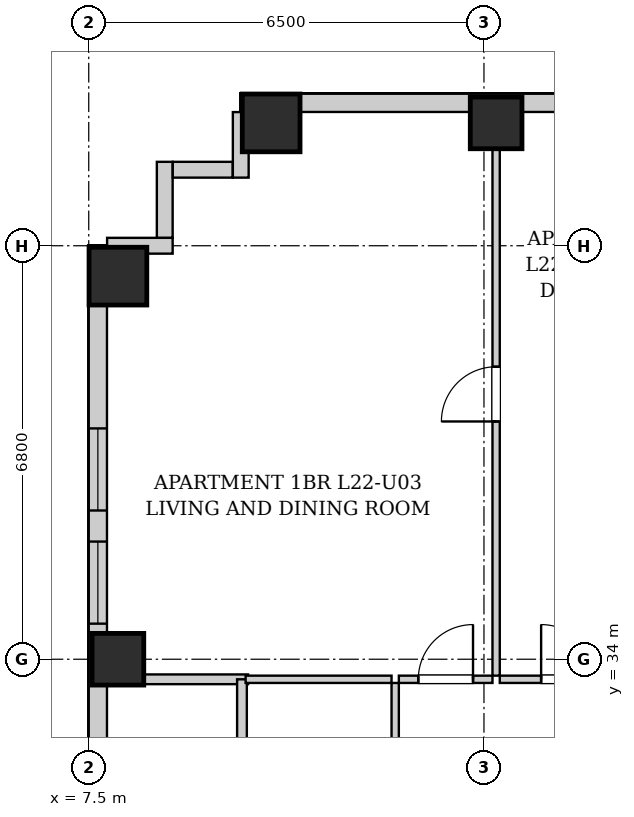
"""IFC4 building model, lengths in metres.
Left out: names, types, materials, properties, quantities, classifications, styles, units other than length and angle.
Written with IfcOpenShell. Run it as: python <this file> out.ifc"""

import sys

from ifc_helpers import new_model, si_unit, direction, frame, frame_2d, origin, origin_2d, place, context, subcontext, project, spatial, rectangle, extrude, element, fill, save


model = new_model("IFC4")
c1 = context("Model", 3, precision=1e-05, world=origin(), true_north=direction((0.0, 1.0)))
c2 = subcontext(c1, "Body", "Model", "MODEL_VIEW")
j1 = project(units=[si_unit("LENGTHUNIT", "METRE"), si_unit("PLANEANGLEUNIT", "RADIAN")], contexts=[c1])
p1 = place(None, origin())
s1 = spatial("IfcSite", under=j1, at=p1, CompositionType="ELEMENT")
p2 = place(p1, origin())
s2 = spatial("IfcBuilding", under=s1, at=p2, CompositionType="ELEMENT")
p3 = place(p2, frame((0.0, 0.0, 81.5)))
s3 = spatial("IfcBuildingStorey", under=s2, at=p3, CompositionType="ELEMENT", Elevation=81.5)
p4 = place(p3, frame((10.5, 42.82, 0.0), z_axis=(0.0, 0.0, 1.0), x_axis=(1.0, 0.0, 0.0)))
e1 = element("IfcColumn", 1, at=p4, inside=s3, PredefinedType="COLUMN", context=c2, shape_type="SweptSolid", body=[
    extrude(rectangle(XDim=0.95, YDim=0.95, at=origin_2d()), origin(), (0.0, 0.0, 1.0), 3.2),
])
for number, where, z_axis, x_axis in (
    (2, (14.2, 42.82, 0.0), (0.0, 0.0, 1.0), (1.0, 0.0, 0.0)),
    (3, (7.98, 34.0, 0.0), (0.0, 0.0, 1.0), (1.0, 0.0, 0.0)),
):
    element("IfcColumn", number, at=place(p3, frame(where, z_axis=z_axis, x_axis=x_axis)), inside=s3, PredefinedType="COLUMN", context=c2, shape_type="SweptSolid", body=[
        extrude(rectangle(XDim=0.85, YDim=0.85, at=origin_2d()), origin(), (0.0, 0.0, 1.0), 3.2),
    ])
p5 = place(p3, frame((7.98, 40.3, 0.0), z_axis=(0.0, 0.0, 1.0), x_axis=(1.0, 0.0, 0.0)))
e4 = element("IfcColumn", 4, at=p5, inside=s3, PredefinedType="COLUMN", context=c2, shape_type="SweptSolid", body=[
    extrude(rectangle(XDim=0.95, YDim=0.95, at=origin_2d()), origin(), (0.0, 0.0, 1.0), 3.2),
])
p6 = place(p3, frame((10.0, 43.15, 0.0), z_axis=(0.0, 0.0, 1.0), x_axis=(1.0, 0.0, 0.0)))
e5 = element("IfcWall", 5, at=p6, inside=s3, PredefinedType="SOLIDWALL", context=c2, shape_type="SweptSolid", body=[
    extrude(rectangle(XDim=22.5, YDim=0.3, at=frame_2d((11.25, 0.0))), origin(), (0.0, 0.0, 1.0), 2.94),
])
p7 = place(p6, frame((5.475, 0.0, 0.55)))
e6 = element("IfcOpeningElement", 6, at=p7, cuts=e5, PredefinedType="OPENING", context=c2, shape_type="SweptSolid", body=[
    extrude(rectangle(XDim=1.35, YDim=1.2, at=frame_2d((0.675, 0.6))), frame((0.0, 0.16, 0.0), z_axis=(0.0, -1.0, 0.0), x_axis=(1.0, 0.0, 0.0)), (0.0, 0.0, 1.0), 0.32),
])
p8 = place(p6, frame((9.3, 0.0, 0.55)))
e7 = element("IfcOpeningElement", 7, at=p8, cuts=e5, PredefinedType="OPENING", context=c2, shape_type="SweptSolid", body=[
    extrude(rectangle(XDim=1.35, YDim=1.2, at=frame_2d((0.675, 0.6))), frame((0.0, 0.16, 0.0), z_axis=(0.0, -1.0, 0.0), x_axis=(1.0, 0.0, 0.0)), (0.0, 0.0, 1.0), 0.32),
])
p9 = place(p6, frame((18.975, 0.0, 0.55)))
e8 = element("IfcOpeningElement", 8, at=p9, cuts=e5, PredefinedType="OPENING", context=c2, shape_type="SweptSolid", body=[
    extrude(rectangle(XDim=1.35, YDim=1.2, at=frame_2d((0.675, 0.6))), frame((0.0, 0.16, 0.0), z_axis=(0.0, -1.0, 0.0), x_axis=(1.0, 0.0, 0.0)), (0.0, 0.0, 1.0), 0.32),
])
p10 = place(p6, frame((21.59, 0.0, 0.55)))
e9 = element("IfcOpeningElement", 9, at=p10, cuts=e5, PredefinedType="OPENING", context=c2, shape_type="SweptSolid", body=[
    extrude(rectangle(XDim=0.68, YDim=1.2, at=frame_2d((0.34, 0.6))), frame((0.0, 0.16, 0.0), z_axis=(0.0, -1.0, 0.0), x_axis=(1.0, 0.0, 0.0)), (0.0, 0.0, 1.0), 0.32),
])
p11 = place(p3, frame((7.65, 2.5, 0.0), z_axis=(0.0, 0.0, 1.0), x_axis=(0.0, 1.0, 0.0)))
e10 = element("IfcWall", 10, at=p11, inside=s3, PredefinedType="SOLIDWALL", context=c2, shape_type="SweptSolid", body=[
    extrude(rectangle(XDim=38.3, YDim=0.3, at=frame_2d((19.15, 0.0))), origin(), (0.0, 0.0, 1.0), 2.94),
])
p12 = place(p11, frame((3.38, 0.0, 0.55)))
e11 = element("IfcOpeningElement", 11, at=p12, cuts=e10, PredefinedType="OPENING", context=c2, shape_type="SweptSolid", body=[
    extrude(rectangle(XDim=1.35, YDim=1.2, at=frame_2d((0.675, 0.6))), frame((0.0, 0.16, 0.0), z_axis=(0.0, -1.0, 0.0), x_axis=(1.0, 0.0, 0.0)), (0.0, 0.0, 1.0), 0.32),
])
p13 = place(p11, frame((1.135, 0.0, 0.55)))
e12 = element("IfcOpeningElement", 12, at=p13, cuts=e10, PredefinedType="OPENING", context=c2, shape_type="SweptSolid", body=[
    extrude(rectangle(XDim=1.35, YDim=1.2, at=frame_2d((0.675, 0.6))), frame((0.0, 0.16, 0.0), z_axis=(0.0, -1.0, 0.0), x_axis=(1.0, 0.0, 0.0)), (0.0, 0.0, 1.0), 0.32),
])
p14 = place(p11, frame((33.946, 0.0, 0.55)))
e13 = element("IfcOpeningElement", 13, at=p14, cuts=e10, PredefinedType="OPENING", context=c2, shape_type="SweptSolid", body=[
    extrude(rectangle(XDim=1.35, YDim=1.2, at=frame_2d((0.675, 0.6))), frame((0.0, 0.16, 0.0), z_axis=(0.0, -1.0, 0.0), x_axis=(1.0, 0.0, 0.0)), (0.0, 0.0, 1.0), 0.32),
])
p15 = place(p11, frame((32.085, 0.0, 0.55)))
e14 = element("IfcOpeningElement", 14, at=p15, cuts=e10, PredefinedType="OPENING", context=c2, shape_type="SweptSolid", body=[
    extrude(rectangle(XDim=1.35, YDim=1.2, at=frame_2d((0.675, 0.6))), frame((0.0, 0.16, 0.0), z_axis=(0.0, -1.0, 0.0), x_axis=(1.0, 0.0, 0.0)), (0.0, 0.0, 1.0), 0.32),
])
p16 = place(p11, frame((14.194, 0.0, 0.55)))
e15 = element("IfcOpeningElement", 15, at=p16, cuts=e10, PredefinedType="OPENING", context=c2, shape_type="SweptSolid", body=[
    extrude(rectangle(XDim=1.35, YDim=1.2, at=frame_2d((0.675, 0.6))), frame((0.0, 0.16, 0.0), z_axis=(0.0, -1.0, 0.0), x_axis=(1.0, 0.0, 0.0)), (0.0, 0.0, 1.0), 0.32),
])
p17 = place(p11, frame((23.582, 0.0, 0.55)))
e16 = element("IfcOpeningElement", 16, at=p17, cuts=e10, PredefinedType="OPENING", context=c2, shape_type="SweptSolid", body=[
    extrude(rectangle(XDim=1.35, YDim=1.2, at=frame_2d((0.675, 0.6))), frame((0.0, 0.16, 0.0), z_axis=(0.0, -1.0, 0.0), x_axis=(1.0, 0.0, 0.0)), (0.0, 0.0, 1.0), 0.32),
])
p18 = place(p3, frame((7.802, 40.8, 0.0), z_axis=(0.0, 0.0, 1.0), x_axis=(1.0, 0.0, 0.0)))
e17 = element("IfcWall", 17, at=p18, inside=s3, PredefinedType="SOLIDWALL", context=c2, shape_type="SweptSolid", body=[
    extrude(rectangle(XDim=1.078, YDim=0.26, at=frame_2d((0.539, 0.0))), origin(), (0.0, 0.0, 1.0), 2.94),
])
p19 = place(p3, frame((8.75, 40.932, 0.0), z_axis=(0.0, 0.0, 1.0), x_axis=(0.0, 1.0, 0.0)))
e18 = element("IfcWall", 18, at=p19, inside=s3, PredefinedType="SOLIDWALL", context=c2, shape_type="SweptSolid", body=[
    extrude(rectangle(XDim=1.248, YDim=0.26, at=frame_2d((0.624, 0.0))), origin(), (0.0, 0.0, 1.0), 2.94),
])
p20 = place(p3, frame((8.882, 42.05, 0.0), z_axis=(0.0, 0.0, 1.0), x_axis=(1.0, 0.0, 0.0)))
e19 = element("IfcWall", 19, at=p20, inside=s3, PredefinedType="SOLIDWALL", context=c2, shape_type="SweptSolid", body=[
    extrude(rectangle(XDim=0.986, YDim=0.26, at=frame_2d((0.493, 0.0))), origin(), (0.0, 0.0, 1.0), 2.94),
])
p21 = place(p3, frame((10.0, 41.92, 0.0), z_axis=(0.0, 0.0, 1.0), x_axis=(0.0, 1.0, 0.0)))
e20 = element("IfcWall", 20, at=p21, inside=s3, PredefinedType="SOLIDWALL", context=c2, shape_type="SweptSolid", body=[
    extrude(rectangle(XDim=1.078, YDim=0.26, at=frame_2d((0.539, 0.0))), origin(), (0.0, 0.0, 1.0), 2.94),
])
p22 = place(p3, frame((7.78, 33.67, 0.0), z_axis=(0.0, 0.0, 1.0), x_axis=(1.0, 0.0, 0.0)))
e21 = element("IfcWall", 21, at=p22, inside=s3, PredefinedType="PARTITIONING", context=c2, shape_type="SweptSolid", body=[
    extrude(rectangle(XDim=2.34, YDim=0.16, at=frame_2d((1.17, 0.0))), origin(), (0.0, 0.0, 1.0), 2.94),
])
p23 = place(p3, frame((10.02, 30.76, 0.0), z_axis=(0.0, 0.0, 1.0), x_axis=(0.0, 1.0, 0.0)))
e22 = element("IfcWall", 22, at=p23, inside=s3, PredefinedType="PARTITIONING", context=c2, shape_type="SweptSolid", body=[
    extrude(rectangle(XDim=2.91, YDim=0.16, at=frame_2d((1.455, 0.0))), origin(), (0.0, 0.0, 1.0), 2.94),
])
p24 = place(p3, frame((12.54, 30.76, 0.0), z_axis=(0.0, 0.0, 1.0), x_axis=(0.0, 1.0, 0.0)))
e23 = element("IfcWall", 23, at=p24, inside=s3, PredefinedType="PARTITIONING", context=c2, shape_type="SweptSolid", body=[
    extrude(rectangle(XDim=2.85, YDim=0.12, at=frame_2d((1.425, 0.0))), origin(), (0.0, 0.0, 1.0), 2.94),
])
p25 = place(p24, frame((0.995, 0.0, 0.0)))
e24 = element("IfcOpeningElement", 24, at=p25, cuts=e23, PredefinedType="OPENING", context=c2, shape_type="SweptSolid", body=[
    extrude(rectangle(XDim=0.86, YDim=2.05, at=frame_2d((0.43, 1.025))), frame((0.0, 0.07, 0.0), z_axis=(0.0, -1.0, 0.0), x_axis=(1.0, 0.0, 0.0)), (0.0, 0.0, 1.0), 0.14),
])
p26 = place(p3, frame((10.08, 33.67, 0.0), z_axis=(0.0, 0.0, 1.0), x_axis=(1.0, 0.0, 0.0)))
e25 = element("IfcWall", 25, at=p26, inside=s3, PredefinedType="PARTITIONING", context=c2, shape_type="SweptSolid", body=[
    extrude(rectangle(XDim=2.4, YDim=0.12, at=frame_2d((1.2, 0.0))), origin(), (0.0, 0.0, 1.0), 2.94),
])
p27 = place(p3, frame((12.6, 33.67, 0.0), z_axis=(0.0, 0.0, 1.0), x_axis=(1.0, 0.0, 0.0)))
e26 = element("IfcWall", 26, at=p27, inside=s3, PredefinedType="PARTITIONING", context=c2, shape_type="SweptSolid", body=[
    extrude(rectangle(XDim=1.54, YDim=0.12, at=frame_2d((0.77, 0.0))), origin(), (0.0, 0.0, 1.0), 2.94),
])
p28 = place(p27, frame((0.32, 0.0, 0.0)))
e27 = element("IfcOpeningElement", 27, at=p28, cuts=e26, PredefinedType="OPENING", context=c2, shape_type="SweptSolid", body=[
    extrude(rectangle(XDim=0.9, YDim=2.05, at=frame_2d((0.45, 1.025))), frame((0.0, 0.07, 0.0), z_axis=(0.0, -1.0, 0.0), x_axis=(1.0, 0.0, 0.0)), (0.0, 0.0, 1.0), 0.14),
])
p29 = place(p3, frame((14.26, 33.67, 0.0), z_axis=(0.0, 0.0, 1.0), x_axis=(1.0, 0.0, 0.0)))
e28 = element("IfcWall", 28, at=p29, inside=s3, PredefinedType="PARTITIONING", context=c2, shape_type="SweptSolid", body=[
    extrude(rectangle(XDim=2.26, YDim=0.12, at=frame_2d((1.13, 0.0))), origin(), (0.0, 0.0, 1.0), 2.94),
])
p30 = place(p29, frame((0.68, 0.0, 0.0)))
e29 = element("IfcOpeningElement", 29, at=p30, cuts=e28, PredefinedType="OPENING", context=c2, shape_type="SweptSolid", body=[
    extrude(rectangle(XDim=0.9, YDim=2.05, at=frame_2d((0.45, 1.025))), frame((0.0, 0.07, 0.0), z_axis=(0.0, -1.0, 0.0), x_axis=(1.0, 0.0, 0.0)), (0.0, 0.0, 1.0), 0.14),
])
p31 = place(p3, frame((14.2, 33.73, 0.0), z_axis=(0.0, 0.0, 1.0), x_axis=(0.0, 1.0, 0.0)))
e30 = element("IfcWall", 30, at=p31, inside=s3, PredefinedType="PARTITIONING", context=c2, shape_type="SweptSolid", body=[
    extrude(rectangle(XDim=9.29, YDim=0.12, at=frame_2d((4.645, 0.0))), origin(), (0.0, 0.0, 1.0), 2.94),
])
p32 = place(p31, frame((4.18, 0.0, 0.0)))
e31 = element("IfcOpeningElement", 31, at=p32, cuts=e30, PredefinedType="OPENING", context=c2, shape_type="SweptSolid", body=[
    extrude(rectangle(XDim=0.9, YDim=2.05, at=frame_2d((0.45, 1.025))), frame((0.0, 0.07, 0.0), z_axis=(0.0, -1.0, 0.0), x_axis=(1.0, 0.0, 0.0)), (0.0, 0.0, 1.0), 0.14),
])
p33 = place(p28, origin())
e32 = element("IfcDoor", 32, at=p33, inside=s3, OperationType="SINGLE_SWING_RIGHT", PredefinedType="DOOR", context=c2, shape_type="SweptSolid", body=[
    extrude(rectangle(XDim=0.9, YDim=2.05, at=frame_2d((0.45, 1.025))), frame((0.0, 0.025, 0.0), z_axis=(0.0, -1.0, 0.0), x_axis=(1.0, 0.0, 0.0)), (0.0, 0.0, 1.0), 0.05),
])
fill(e27, e32)
p34 = place(p30, origin())
e33 = element("IfcDoor", 33, at=p34, inside=s3, OperationType="SINGLE_SWING_LEFT", PredefinedType="DOOR", context=c2, shape_type="SweptSolid", body=[
    extrude(rectangle(XDim=0.9, YDim=2.05, at=frame_2d((0.45, 1.025))), frame((0.0, 0.025, 0.0), z_axis=(0.0, -1.0, 0.0), x_axis=(1.0, 0.0, 0.0)), (0.0, 0.0, 1.0), 0.05),
])
fill(e29, e33)
p35 = place(p32, origin())
e34 = element("IfcDoor", 34, at=p35, inside=s3, OperationType="SINGLE_SWING_LEFT", PredefinedType="DOOR", context=c2, shape_type="SweptSolid", body=[
    extrude(rectangle(XDim=0.9, YDim=2.05, at=frame_2d((0.45, 1.025))), frame((0.0, 0.025, 0.0), z_axis=(0.0, -1.0, 0.0), x_axis=(1.0, 0.0, 0.0)), (0.0, 0.0, 1.0), 0.05),
])
fill(e31, e34)
p36 = place(p14, origin())
e35 = element("IfcWindow", 35, at=p36, inside=s3, PartitioningType="SINGLE_PANEL", PredefinedType="WINDOW", context=c2, shape_type="SweptSolid", body=[
    extrude(rectangle(XDim=1.35, YDim=1.2, at=frame_2d((0.675, 0.6))), frame((0.0, 0.03, 0.0), z_axis=(0.0, -1.0, 0.0), x_axis=(1.0, 0.0, 0.0)), (0.0, 0.0, 1.0), 0.06),
])
fill(e13, e35)
p37 = place(p15, origin())
e36 = element("IfcWindow", 36, at=p37, inside=s3, PartitioningType="SINGLE_PANEL", PredefinedType="WINDOW", context=c2, shape_type="SweptSolid", body=[
    extrude(rectangle(XDim=1.35, YDim=1.2, at=frame_2d((0.675, 0.6))), frame((0.0, 0.03, 0.0), z_axis=(0.0, -1.0, 0.0), x_axis=(1.0, 0.0, 0.0)), (0.0, 0.0, 1.0), 0.06),
])
fill(e14, e36)
save(model, sys.argv[1])
